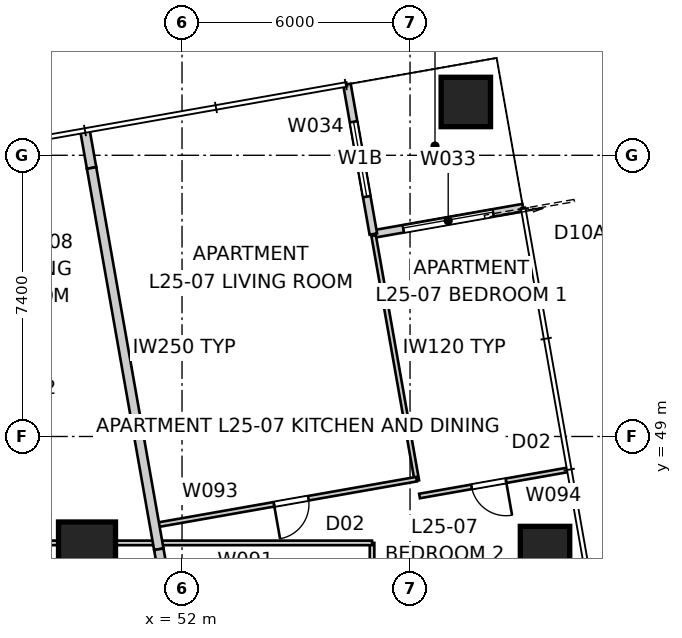
"""IFC4 building model, lengths in metres.
Left out: names, types, materials, properties, quantities, classifications, styles, units other than length and angle.
Written with IfcOpenShell. Run it as: python <this file> out.ifc"""

import sys

from ifc_helpers import new_model, si_unit, direction, frame, frame_2d, origin, origin_2d, place, context, subcontext, project, spatial, rectangle, extrude, element, fill, save


model = new_model("IFC4")
c1 = context("Model", 3, precision=1e-05, world=origin(), true_north=direction((0.0, 1.0)))
c2 = subcontext(c1, "Body", "Model", "MODEL_VIEW")
j1 = project(units=[si_unit("LENGTHUNIT", "METRE"), si_unit("PLANEANGLEUNIT", "RADIAN")], contexts=[c1])
p1 = place(None, origin())
s1 = spatial("IfcSite", under=j1, at=p1, CompositionType="ELEMENT")
p2 = place(p1, origin())
s2 = spatial("IfcBuilding", under=s1, at=p2, CompositionType="ELEMENT")
p3 = place(p2, frame((0.0, 0.0, 93.0)))
s3 = spatial("IfcBuildingStorey", under=s2, at=p3, CompositionType="ELEMENT", Elevation=93.0)
for number, where, z_axis, x_axis in (
    (1, (61.552, 45.985, 0.0), (0.0, 0.0, 1.0), (1.0, 0.0, 0.0)),
    (2, (59.468, 57.803, 0.0), (0.0, 0.0, 1.0), (1.0, 0.0, 0.0)),
):
    element("IfcColumn", number, at=place(p3, frame(where, z_axis=z_axis, x_axis=x_axis)), inside=s3, PredefinedType="COLUMN", context=c2, shape_type="SweptSolid", body=[
        extrude(rectangle(XDim=1.3, YDim=1.3, at=origin_2d()), origin(), (0.0, 0.0, 1.0), 3.4),
    ])
p4 = place(p3, frame((49.5, 46.0, 0.0), z_axis=(0.0, 0.0, 1.0), x_axis=(1.0, 0.0, 0.0)))
e3 = element("IfcColumn", 3, at=p4, inside=s3, PredefinedType="COLUMN", context=c2, shape_type="SweptSolid", body=[
    extrude(rectangle(XDim=1.5, YDim=1.5, at=origin_2d()), origin(), (0.0, 0.0, 1.0), 3.4),
])
p5 = place(p3, frame((60.974, 55.022, 0.0), z_axis=(0.0, 0.0, 1.0), x_axis=(-0.984808127031, -0.173646056486, 0.0)))
e4 = element("IfcWall", 4, at=p5, inside=s3, PredefinedType="SOLIDWALL", context=c2, shape_type="SweptSolid", body=[
    extrude(rectangle(XDim=4.0, YDim=0.2, at=frame_2d((2.0, 0.0))), origin(), (0.0, 0.0, 1.0), 3.25),
])
p6 = place(p5, frame((0.8, 0.0, 0.0)))
e5 = element("IfcOpeningElement", 5, at=p6, cuts=e4, PredefinedType="OPENING", context=c2, shape_type="SweptSolid", body=[
    extrude(rectangle(XDim=2.4, YDim=2.1, at=frame_2d((1.2, 1.05))), frame((0.0, 0.11, 0.0), z_axis=(0.0, -1.0, 0.0), x_axis=(1.0, 0.0, 0.0)), (0.0, 0.0, 1.0), 0.22),
])
p7 = place(p3, frame((57.034, 54.328, 0.0), z_axis=(0.0, 0.0, 1.0), x_axis=(-0.173646056486, 0.984808127031, 0.0)))
e6 = element("IfcWall", 6, at=p7, inside=s3, PredefinedType="SOLIDWALL", context=c2, shape_type="SweptSolid", body=[
    extrude(rectangle(XDim=4.0, YDim=0.2, at=frame_2d((2.0, 0.0))), origin(), (0.0, 0.0, 1.0), 3.25),
])
p8 = place(p7, frame((1.0, 0.0, 0.45)))
e7 = element("IfcOpeningElement", 7, at=p8, cuts=e6, PredefinedType="OPENING", context=c2, shape_type="SweptSolid", body=[
    extrude(rectangle(XDim=2.0, YDim=1.8, at=frame_2d((1.0, 0.9))), frame((0.0, 0.11, 0.0), z_axis=(0.0, -1.0, 0.0), x_axis=(1.0, 0.0, 0.0)), (0.0, 0.0, 1.0), 0.22),
])
p9 = place(p3, frame((49.446, 57.051, 0.0), z_axis=(0.0, 0.0, 1.0), x_axis=(0.173813186416, -0.984778643263, 0.0)))
e8 = element("IfcWall", 8, at=p9, inside=s3, PredefinedType="PARTITIONING", context=c2, shape_type="SweptSolid", body=[
    extrude(rectangle(XDim=1.0, YDim=0.25, at=frame_2d((0.5, 0.0))), origin(), (0.0, 0.0, 1.0), 3.25),
])
p10 = place(p3, frame((49.62, 56.066, 0.0), z_axis=(0.0, 0.0, 1.0), x_axis=(0.173644522411, -0.984808397525, 0.0)))
e9 = element("IfcWall", 9, at=p10, inside=s3, PredefinedType="PARTITIONING", context=c2, shape_type="SweptSolid", body=[
    extrude(rectangle(XDim=10.188, YDim=0.25, at=frame_2d((5.094, 0.0))), origin(), (0.0, 0.0, 1.0), 2.638),
])
p11 = place(p3, frame((51.389, 46.033, 0.0), z_axis=(0.0, 0.0, 1.0), x_axis=(0.173657387043, -0.984806129106, 0.0)))
e10 = element("IfcWall", 10, at=p11, inside=s3, PredefinedType="PARTITIONING", context=c2, shape_type="SweptSolid", body=[
    extrude(rectangle(XDim=2.286, YDim=0.25, at=frame_2d((1.143, 0.0))), origin(), (0.0, 0.0, 1.0), 3.25),
])
p12 = place(p3, frame((57.0, 46.2, 0.0), z_axis=(0.0, 0.0, 1.0), x_axis=(0.0, -1.0, 0.0)))
e11 = element("IfcWall", 11, at=p12, inside=s3, PredefinedType="PARTITIONING", context=c2, shape_type="SweptSolid", body=[
    extrude(rectangle(XDim=32.4, YDim=0.12, at=frame_2d((16.2, 0.0))), origin(), (0.0, 0.0, 1.0), 2.55),
])
p13 = place(p12, frame((10.396, 0.0, 0.0)))
e12 = element("IfcOpeningElement", 12, at=p13, cuts=e11, PredefinedType="OPENING", context=c2, shape_type="SweptSolid", body=[
    extrude(rectangle(XDim=0.92, YDim=2.34, at=frame_2d((0.46, 1.17))), frame((0.0, 0.07, 0.0), z_axis=(0.0, -1.0, 0.0), x_axis=(1.0, 0.0, 0.0)), (0.0, 0.0, 1.0), 0.14),
])
p14 = place(p12, frame((7.587, 0.0, 0.0)))
e13 = element("IfcOpeningElement", 13, at=p14, cuts=e11, PredefinedType="OPENING", context=c2, shape_type="SweptSolid", body=[
    extrude(rectangle(XDim=0.92, YDim=2.34, at=frame_2d((0.46, 1.17))), frame((0.0, 0.07, 0.0), z_axis=(0.0, -1.0, 0.0), x_axis=(1.0, 0.0, 0.0)), (0.0, 0.0, 1.0), 0.14),
])
p15 = place(p12, frame((3.843, 0.0, 0.0)))
e14 = element("IfcOpeningElement", 14, at=p15, cuts=e11, PredefinedType="OPENING", context=c2, shape_type="SweptSolid", body=[
    extrude(rectangle(XDim=0.92, YDim=2.34, at=frame_2d((0.46, 1.17))), frame((0.0, 0.07, 0.0), z_axis=(0.0, -1.0, 0.0), x_axis=(1.0, 0.0, 0.0)), (0.0, 0.0, 1.0), 0.14),
])
p16 = place(p12, frame((27.988, 0.0, 0.0)))
e15 = element("IfcOpeningElement", 15, at=p16, cuts=e11, PredefinedType="OPENING", context=c2, shape_type="SweptSolid", body=[
    extrude(rectangle(XDim=0.92, YDim=2.34, at=frame_2d((0.46, 1.17))), frame((0.0, 0.07, 0.0), z_axis=(0.0, -1.0, 0.0), x_axis=(1.0, 0.0, 0.0)), (0.0, 0.0, 1.0), 0.14),
])
p17 = place(p12, frame((23.957, 0.0, 0.0)))
e16 = element("IfcOpeningElement", 16, at=p17, cuts=e11, PredefinedType="OPENING", context=c2, shape_type="SweptSolid", body=[
    extrude(rectangle(XDim=0.96, YDim=2.1, at=frame_2d((0.48, 1.05))), frame((0.0, 0.07, 0.0), z_axis=(0.0, -1.0, 0.0), x_axis=(1.0, 0.0, 0.0)), (0.0, 0.0, 1.0), 0.14),
])
p18 = place(p12, frame((21.108, 0.0, 0.0)))
e17 = element("IfcOpeningElement", 17, at=p18, cuts=e11, PredefinedType="OPENING", context=c2, shape_type="SweptSolid", body=[
    extrude(rectangle(XDim=0.96, YDim=2.1, at=frame_2d((0.48, 1.05))), frame((0.0, 0.07, 0.0), z_axis=(0.0, -1.0, 0.0), x_axis=(1.0, 0.0, 0.0)), (0.0, 0.0, 1.0), 0.14),
])
p19 = place(p3, frame((23.0, 46.2, 0.0), z_axis=(0.0, 0.0, 1.0), x_axis=(1.0, 0.0, 0.0)))
e18 = element("IfcWall", 18, at=p19, inside=s3, PredefinedType="PARTITIONING", context=c2, shape_type="SweptSolid", body=[
    extrude(rectangle(XDim=34.0, YDim=0.12, at=frame_2d((17.0, 0.0))), origin(), (0.0, 0.0, 1.0), 2.55),
])
p20 = place(p19, frame((18.989, 0.0, 0.0)))
e19 = element("IfcOpeningElement", 19, at=p20, cuts=e18, PredefinedType="OPENING", context=c2, shape_type="SweptSolid", body=[
    extrude(rectangle(XDim=0.92, YDim=2.34, at=frame_2d((0.46, 1.17))), frame((0.0, 0.07, 0.0), z_axis=(0.0, -1.0, 0.0), x_axis=(1.0, 0.0, 0.0)), (0.0, 0.0, 1.0), 0.14),
])
p21 = place(p19, frame((1.306, 0.0, 0.0)))
e20 = element("IfcOpeningElement", 20, at=p21, cuts=e18, PredefinedType="OPENING", context=c2, shape_type="SweptSolid", body=[
    extrude(rectangle(XDim=0.92, YDim=2.34, at=frame_2d((0.46, 1.17))), frame((0.0, 0.07, 0.0), z_axis=(0.0, -1.0, 0.0), x_axis=(1.0, 0.0, 0.0)), (0.0, 0.0, 1.0), 0.14),
])
p22 = place(p19, frame((13.884, 0.0, 0.0)))
e21 = element("IfcOpeningElement", 21, at=p22, cuts=e18, PredefinedType="OPENING", context=c2, shape_type="SweptSolid", body=[
    extrude(rectangle(XDim=0.96, YDim=2.1, at=frame_2d((0.48, 1.05))), frame((0.0, 0.07, 0.0), z_axis=(0.0, -1.0, 0.0), x_axis=(1.0, 0.0, 0.0)), (0.0, 0.0, 1.0), 0.14),
])
p23 = place(p19, frame((21.929, 0.0, 0.0)))
e22 = element("IfcOpeningElement", 22, at=p23, cuts=e18, PredefinedType="OPENING", context=c2, shape_type="SweptSolid", body=[
    extrude(rectangle(XDim=0.96, YDim=2.1, at=frame_2d((0.48, 1.05))), frame((0.0, 0.07, 0.0), z_axis=(0.0, -1.0, 0.0), x_axis=(1.0, 0.0, 0.0)), (0.0, 0.0, 1.0), 0.14),
])
p24 = place(p3, frame((57.041, 54.288, 0.0), z_axis=(0.0, 0.0, 1.0), x_axis=(0.173657751636, -0.984806064815, 0.0)))
e23 = element("IfcWall", 23, at=p24, inside=s3, PredefinedType="PARTITIONING", context=c2, shape_type="SweptSolid", body=[
    extrude(rectangle(XDim=6.55, YDim=0.12, at=frame_2d((3.275, 0.0))), origin(), (0.0, 0.0, 1.0), 3.25),
])
p25 = place(p3, frame((58.172, 47.877, 0.0), z_axis=(0.0, 0.0, 1.0), x_axis=(-0.984806372973, -0.173656004074, 0.0)))
e24 = element("IfcWall", 24, at=p25, inside=s3, PredefinedType="PARTITIONING", context=c2, shape_type="SweptSolid", body=[
    extrude(rectangle(XDim=7.0, YDim=0.12, at=frame_2d((3.5, 0.0))), origin(), (0.0, 0.0, 1.0), 3.25),
])
p26 = place(p25, frame((2.89, 0.0, 0.0)))
e25 = element("IfcOpeningElement", 25, at=p26, cuts=e24, PredefinedType="OPENING", context=c2, shape_type="SweptSolid", body=[
    extrude(rectangle(XDim=0.92, YDim=2.34, at=frame_2d((0.46, 1.17))), frame((0.0, 0.07, 0.0), z_axis=(0.0, -1.0, 0.0), x_axis=(1.0, 0.0, 0.0)), (0.0, 0.0, 1.0), 0.14),
])
p27 = place(p3, frame((62.15, 48.122, 0.0), z_axis=(0.0, 0.0, 1.0), x_axis=(-0.984804033163, -0.173669272657, 0.0)))
e26 = element("IfcWall", 26, at=p27, inside=s3, PredefinedType="PARTITIONING", context=c2, shape_type="SweptSolid", body=[
    extrude(rectangle(XDim=3.96, YDim=0.12, at=frame_2d((1.98, 0.0))), origin(), (0.0, 0.0, 1.0), 2.638),
])
p28 = place(p27, frame((1.65, 0.0, 0.0)))
e27 = element("IfcOpeningElement", 27, at=p28, cuts=e26, PredefinedType="OPENING", context=c2, shape_type="SweptSolid", body=[
    extrude(rectangle(XDim=0.92, YDim=2.34, at=frame_2d((0.46, 1.17))), frame((0.0, 0.07, 0.0), z_axis=(0.0, -1.0, 0.0), x_axis=(1.0, 0.0, 0.0)), (0.0, 0.0, 1.0), 0.14),
])
p29 = place(p6, origin())
e28 = element("IfcDoor", 28, at=p29, inside=s3, OperationType="SLIDING_TO_LEFT", PredefinedType="DOOR", context=c2, shape_type="SweptSolid", body=[
    extrude(rectangle(XDim=2.4, YDim=2.1, at=frame_2d((1.2, 1.05))), frame((0.0, 0.025, 0.0), z_axis=(0.0, -1.0, 0.0), x_axis=(1.0, 0.0, 0.0)), (0.0, 0.0, 1.0), 0.05),
])
fill(e5, e28)
p30 = place(p8, origin())
e29 = element("IfcWindow", 29, at=p30, inside=s3, PartitioningType="SINGLE_PANEL", PredefinedType="WINDOW", context=c2, shape_type="SweptSolid", body=[
    extrude(rectangle(XDim=2.0, YDim=1.8, at=frame_2d((1.0, 0.9))), frame((0.0, 0.03, 0.0), z_axis=(0.0, -1.0, 0.0), x_axis=(1.0, 0.0, 0.0)), (0.0, 0.0, 1.0), 0.06),
])
fill(e7, e29)
p31 = place(p26, origin())
e30 = element("IfcDoor", 30, at=p31, inside=s3, OperationType="SINGLE_SWING_RIGHT", PredefinedType="DOOR", context=c2, shape_type="SweptSolid", body=[
    extrude(rectangle(XDim=0.92, YDim=2.34, at=frame_2d((0.46, 1.17))), frame((0.0, 0.025, 0.0), z_axis=(0.0, -1.0, 0.0), x_axis=(1.0, 0.0, 0.0)), (0.0, 0.0, 1.0), 0.05),
])
fill(e25, e30)
p32 = place(p28, origin())
e31 = element("IfcDoor", 31, at=p32, inside=s3, OperationType="SINGLE_SWING_LEFT", PredefinedType="DOOR", context=c2, shape_type="SweptSolid", body=[
    extrude(rectangle(XDim=0.92, YDim=2.34, at=frame_2d((0.46, 1.17))), frame((0.0, 0.025, 0.0), z_axis=(0.0, -1.0, 0.0), x_axis=(1.0, 0.0, 0.0)), (0.0, 0.0, 1.0), 0.05),
])
fill(e27, e31)
save(model, sys.argv[1])
